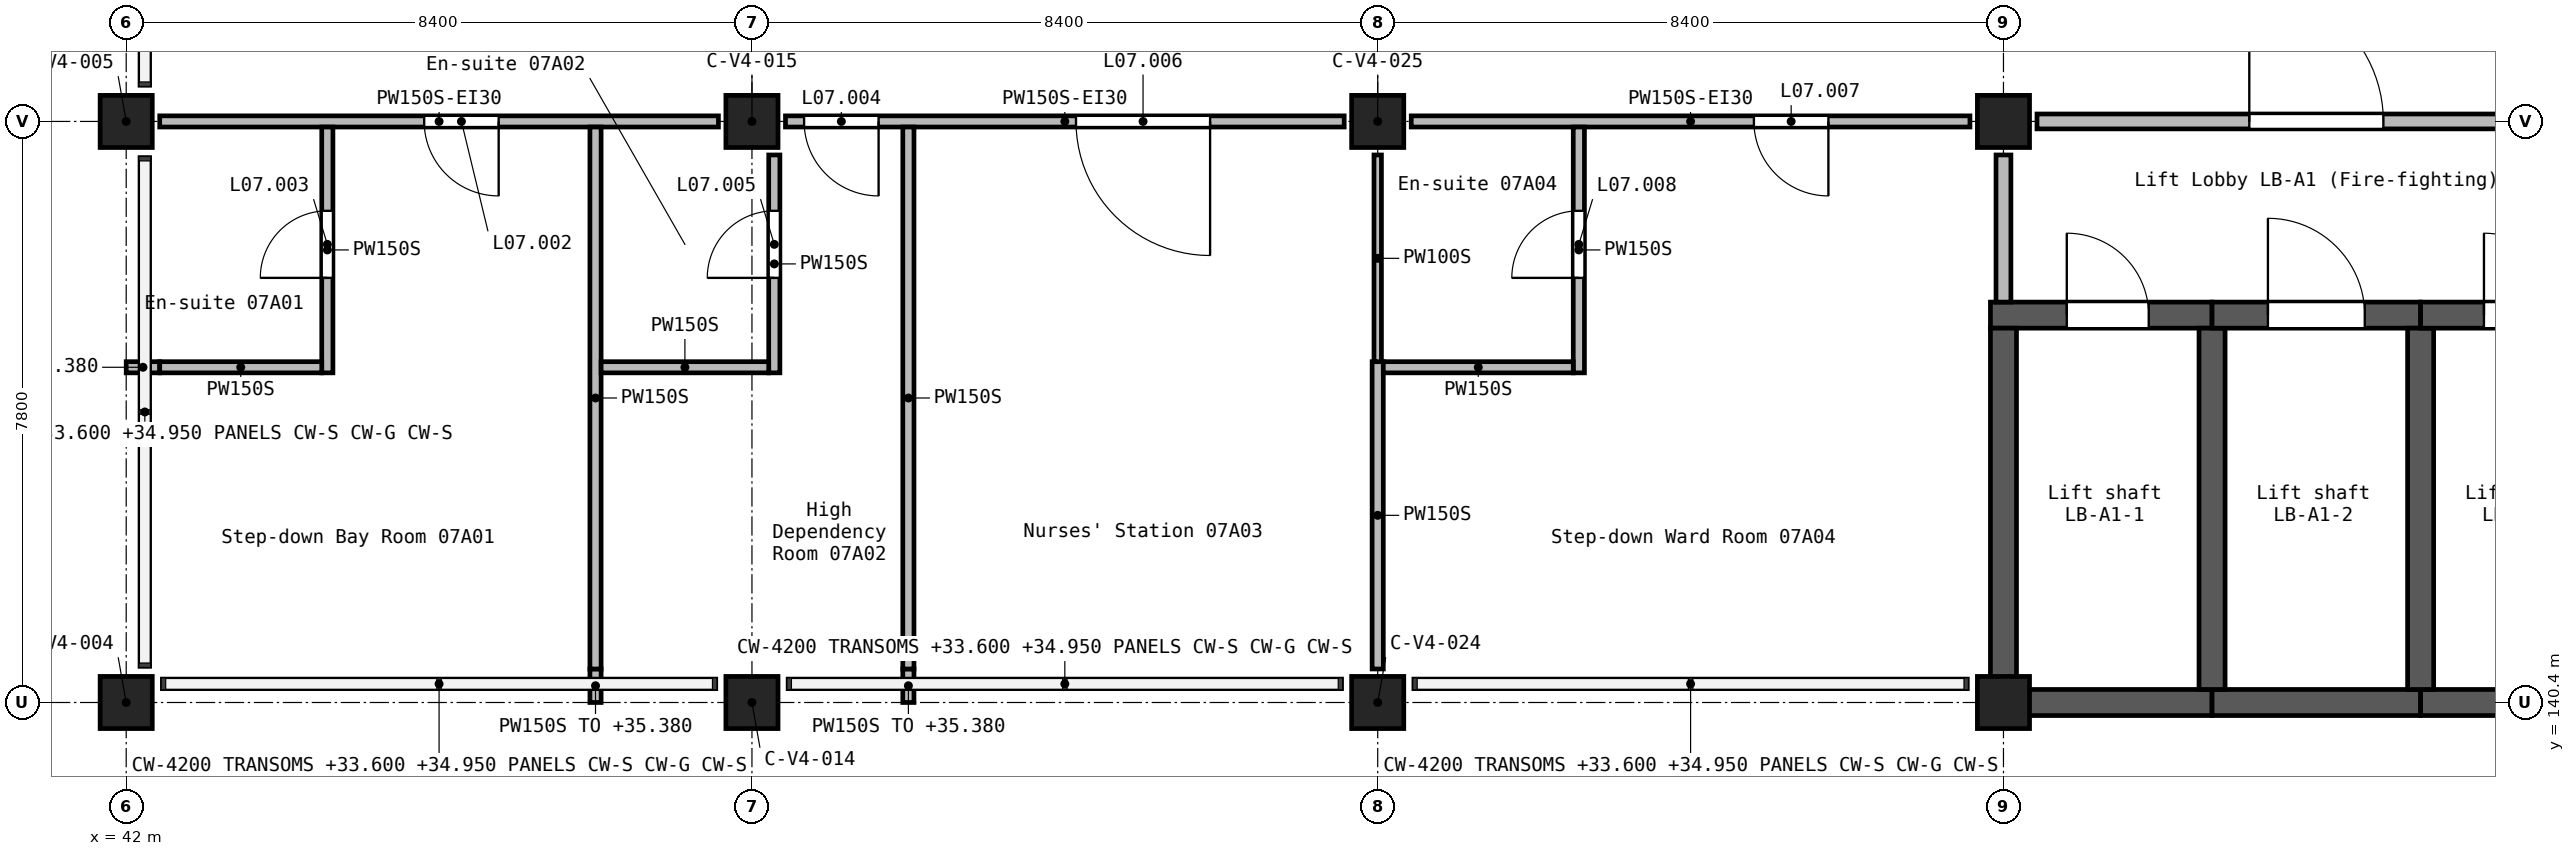
"""IFC4 building model, lengths in metres.
Left out: names, types, materials, properties, quantities, classifications, styles, units other than length and angle.
Written with IfcOpenShell. Run it as: python <this file> out.ifc"""

import sys

from ifc_helpers import new_model, si_unit, direction, frame, frame_2d, origin, origin_2d, place, context, subcontext, project, spatial, rectangle, extrude, element, fill, save


model = new_model("IFC4")
c1 = context("Model", 3, precision=1e-05, world=origin(), true_north=direction((0.0, 1.0)))
c2 = subcontext(c1, "Body", "Model", "MODEL_VIEW")
j1 = project(units=[si_unit("LENGTHUNIT", "METRE"), si_unit("PLANEANGLEUNIT", "RADIAN")], contexts=[c1])
p1 = place(None, origin())
s1 = spatial("IfcSite", under=j1, at=p1, CompositionType="ELEMENT")
p2 = place(p1, origin())
s2 = spatial("IfcBuilding", under=s1, at=p2, CompositionType="ELEMENT")
p3 = place(p2, frame((0.0, 0.0, 32.7)))
s3 = spatial("IfcBuildingStorey", under=s2, at=p3, CompositionType="ELEMENT", Elevation=32.7)
for number, where, z_axis, x_axis in (
    (1, (42.0, 140.4, 0.0), (0.0, 0.0, 1.0), (1.0, 0.0, 0.0)),
    (2, (42.0, 148.2, 0.0), (0.0, 0.0, 1.0), (1.0, 0.0, 0.0)),
    (3, (50.4, 140.4, 0.0), (0.0, 0.0, 1.0), (1.0, 0.0, 0.0)),
    (4, (50.4, 148.2, 0.0), (0.0, 0.0, 1.0), (1.0, 0.0, 0.0)),
    (5, (58.8, 140.4, 0.0), (0.0, 0.0, 1.0), (1.0, 0.0, 0.0)),
    (6, (58.8, 148.2, 0.0), (0.0, 0.0, 1.0), (1.0, 0.0, 0.0)),
    (7, (67.2, 140.4, 0.0), (0.0, 0.0, 1.0), (1.0, 0.0, 0.0)),
    (8, (67.2, 148.2, 0.0), (0.0, 0.0, 1.0), (1.0, 0.0, 0.0)),
):
    element("IfcColumn", number, at=place(p3, frame(where, z_axis=z_axis, x_axis=x_axis)), inside=s3, PredefinedType="COLUMN", context=c2, shape_type="SweptSolid", body=[
        extrude(rectangle(XDim=0.7, YDim=0.7, at=origin_2d()), origin(), (0.0, 0.0, 1.0), 3.9),
    ])
p4 = place(p3, frame((67.025, 145.6, 0.0), z_axis=(0.0, 0.0, 1.0), x_axis=(1.0, 0.0, 0.0)))
e9 = element("IfcWall", 9, at=p4, inside=s3, PredefinedType="SHEAR", context=c2, shape_type="SweptSolid", body=[
    extrude(rectangle(XDim=2.975, YDim=0.35, at=frame_2d((1.488, 0.0))), origin(), (0.0, 0.0, 1.0), 3.9),
])
p5 = place(p4, frame((1.025, 0.0, 0.0)))
e10 = element("IfcOpeningElement", 10, at=p5, cuts=e9, PredefinedType="OPENING", context=c2, shape_type="SweptSolid", body=[
    extrude(rectangle(XDim=1.1, YDim=2.1, at=frame_2d((0.55, 1.05))), frame((0.0, 0.185, 0.0), z_axis=(0.0, -1.0, 0.0), x_axis=(1.0, 0.0, 0.0)), (0.0, 0.0, 1.0), 0.37),
])
p6 = place(p3, frame((67.2, 140.225, 0.0), z_axis=(0.0, 0.0, 1.0), x_axis=(0.0, 1.0, 0.0)))
e11 = element("IfcWall", 11, at=p6, inside=s3, PredefinedType="SHEAR", context=c2, shape_type="SweptSolid", body=[
    extrude(rectangle(XDim=5.2, YDim=0.35, at=frame_2d((2.6, 0.0))), origin(), (0.0, 0.0, 1.0), 3.9),
])
p7 = place(p3, frame((67.375, 140.4, 0.0), z_axis=(0.0, 0.0, 1.0), x_axis=(1.0, 0.0, 0.0)))
e12 = element("IfcWall", 12, at=p7, inside=s3, PredefinedType="SHEAR", context=c2, shape_type="SweptSolid", body=[
    extrude(rectangle(XDim=2.625, YDim=0.35, at=frame_2d((1.312, 0.0))), origin(), (0.0, 0.0, 1.0), 3.9),
])
p8 = place(p3, frame((70.0, 140.4, 0.0), z_axis=(0.0, 0.0, 1.0), x_axis=(1.0, 0.0, 0.0)))
e13 = element("IfcWall", 13, at=p8, inside=s3, PredefinedType="SHEAR", context=c2, shape_type="SweptSolid", body=[
    extrude(rectangle(XDim=2.8, YDim=0.35, at=frame_2d((1.4, 0.0))), origin(), (0.0, 0.0, 1.0), 3.9),
])
p9 = place(p3, frame((70.0, 140.575, 0.0), z_axis=(0.0, 0.0, 1.0), x_axis=(0.0, 1.0, 0.0)))
e14 = element("IfcWall", 14, at=p9, inside=s3, PredefinedType="SHEAR", context=c2, shape_type="SweptSolid", body=[
    extrude(rectangle(XDim=4.85, YDim=0.35, at=frame_2d((2.425, 0.0))), origin(), (0.0, 0.0, 1.0), 3.9),
])
p10 = place(p3, frame((70.0, 145.6, 0.0), z_axis=(0.0, 0.0, 1.0), x_axis=(1.0, 0.0, 0.0)))
e15 = element("IfcWall", 15, at=p10, inside=s3, PredefinedType="SHEAR", context=c2, shape_type="SweptSolid", body=[
    extrude(rectangle(XDim=2.8, YDim=0.35, at=frame_2d((1.4, 0.0))), origin(), (0.0, 0.0, 1.0), 3.9),
])
p11 = place(p10, frame((0.75, 0.0, 0.0)))
e16 = element("IfcOpeningElement", 16, at=p11, cuts=e15, PredefinedType="OPENING", context=c2, shape_type="SweptSolid", body=[
    extrude(rectangle(XDim=1.3, YDim=2.1, at=frame_2d((0.65, 1.05))), frame((0.0, 0.185, 0.0), z_axis=(0.0, -1.0, 0.0), x_axis=(1.0, 0.0, 0.0)), (0.0, 0.0, 1.0), 0.37),
])
p12 = place(p3, frame((72.8, 140.4, 0.0), z_axis=(0.0, 0.0, 1.0), x_axis=(1.0, 0.0, 0.0)))
e17 = element("IfcWall", 17, at=p12, inside=s3, PredefinedType="SHEAR", context=c2, shape_type="SweptSolid", body=[
    extrude(rectangle(XDim=2.625, YDim=0.35, at=frame_2d((1.312, 0.0))), origin(), (0.0, 0.0, 1.0), 3.9),
])
p13 = place(p3, frame((72.8, 140.575, 0.0), z_axis=(0.0, 0.0, 1.0), x_axis=(0.0, 1.0, 0.0)))
e18 = element("IfcWall", 18, at=p13, inside=s3, PredefinedType="SHEAR", context=c2, shape_type="SweptSolid", body=[
    extrude(rectangle(XDim=4.85, YDim=0.35, at=frame_2d((2.425, 0.0))), origin(), (0.0, 0.0, 1.0), 3.9),
])
p14 = place(p3, frame((72.8, 145.6, 0.0), z_axis=(0.0, 0.0, 1.0), x_axis=(1.0, 0.0, 0.0)))
e19 = element("IfcWall", 19, at=p14, inside=s3, PredefinedType="SHEAR", context=c2, shape_type="SweptSolid", body=[
    extrude(rectangle(XDim=2.625, YDim=0.35, at=frame_2d((1.312, 0.0))), origin(), (0.0, 0.0, 1.0), 3.9),
])
p15 = place(p14, frame((0.85, 0.0, 0.0)))
e20 = element("IfcOpeningElement", 20, at=p15, cuts=e19, PredefinedType="OPENING", context=c2, shape_type="SweptSolid", body=[
    extrude(rectangle(XDim=1.1, YDim=2.1, at=frame_2d((0.55, 1.05))), frame((0.0, 0.185, 0.0), z_axis=(0.0, -1.0, 0.0), x_axis=(1.0, 0.0, 0.0)), (0.0, 0.0, 1.0), 0.37),
])
p16 = place(p3, frame((67.65, 148.2, 0.0), z_axis=(0.0, 0.0, 1.0), x_axis=(1.0, 0.0, 0.0)))
e21 = element("IfcWall", 21, at=p16, inside=s3, PredefinedType="SOLIDWALL", context=c2, shape_type="SweptSolid", body=[
    extrude(rectangle(XDim=7.5, YDim=0.2, at=frame_2d((3.75, 0.0))), origin(), (0.0, 0.0, 1.0), 3.6),
])
p17 = place(p16, frame((2.85, 0.0, 0.0)))
e22 = element("IfcOpeningElement", 22, at=p17, cuts=e21, PredefinedType="OPENING", context=c2, shape_type="SweptSolid", body=[
    extrude(rectangle(XDim=1.8, YDim=2.1, at=frame_2d((0.9, 1.05))), frame((0.0, 0.11, 0.0), z_axis=(0.0, -1.0, 0.0), x_axis=(1.0, 0.0, 0.0)), (0.0, 0.0, 1.0), 0.22),
])
p18 = place(p3, frame((67.2, 145.775, 0.0), z_axis=(0.0, 0.0, 1.0), x_axis=(0.0, 1.0, 0.0)))
e23 = element("IfcWall", 23, at=p18, inside=s3, PredefinedType="SOLIDWALL", context=c2, shape_type="SweptSolid", body=[
    extrude(rectangle(XDim=1.975, YDim=0.2, at=frame_2d((0.988, 0.0))), origin(), (0.0, 0.0, 1.0), 3.6),
])
p19 = place(p3, frame((66.75, 148.2, 0.0), z_axis=(0.0, 0.0, 1.0), x_axis=(-1.0, 0.0, 0.0)))
e24 = element("IfcWall", 24, at=p19, inside=s3, PredefinedType="PARTITIONING", context=c2, shape_type="SweptSolid", body=[
    extrude(rectangle(XDim=7.5, YDim=0.15, at=frame_2d((3.75, 0.0))), origin(), (0.0, 0.0, 1.0), 3.6),
])
p20 = place(p19, frame((1.9, 0.0, 0.0)))
e25 = element("IfcOpeningElement", 25, at=p20, cuts=e24, PredefinedType="OPENING", context=c2, shape_type="SweptSolid", body=[
    extrude(rectangle(XDim=1.0, YDim=2.1, at=frame_2d((0.5, 1.05))), frame((0.0, 0.085, 0.0), z_axis=(0.0, -1.0, 0.0), x_axis=(1.0, 0.0, 0.0)), (0.0, 0.0, 1.0), 0.17),
])
p21 = place(p3, frame((58.35, 148.2, 0.0), z_axis=(0.0, 0.0, 1.0), x_axis=(-1.0, 0.0, 0.0)))
e26 = element("IfcWall", 26, at=p21, inside=s3, PredefinedType="PARTITIONING", context=c2, shape_type="SweptSolid", body=[
    extrude(rectangle(XDim=7.5, YDim=0.15, at=frame_2d((3.75, 0.0))), origin(), (0.0, 0.0, 1.0), 3.6),
])
p22 = place(p21, frame((6.25, 0.0, 0.0)))
e27 = element("IfcOpeningElement", 27, at=p22, cuts=e26, PredefinedType="OPENING", context=c2, shape_type="SweptSolid", body=[
    extrude(rectangle(XDim=1.0, YDim=2.1, at=frame_2d((0.5, 1.05))), frame((0.0, 0.085, 0.0), z_axis=(0.0, -1.0, 0.0), x_axis=(1.0, 0.0, 0.0)), (0.0, 0.0, 1.0), 0.17),
])
p23 = place(p21, frame((1.8, 0.0, 0.0)))
e28 = element("IfcOpeningElement", 28, at=p23, cuts=e26, PredefinedType="OPENING", context=c2, shape_type="SweptSolid", body=[
    extrude(rectangle(XDim=1.8, YDim=2.1, at=frame_2d((0.9, 1.05))), frame((0.0, 0.085, 0.0), z_axis=(0.0, -1.0, 0.0), x_axis=(1.0, 0.0, 0.0)), (0.0, 0.0, 1.0), 0.17),
])
p24 = place(p3, frame((49.95, 148.2, 0.0), z_axis=(0.0, 0.0, 1.0), x_axis=(-1.0, 0.0, 0.0)))
e29 = element("IfcWall", 29, at=p24, inside=s3, PredefinedType="PARTITIONING", context=c2, shape_type="SweptSolid", body=[
    extrude(rectangle(XDim=7.5, YDim=0.15, at=frame_2d((3.75, 0.0))), origin(), (0.0, 0.0, 1.0), 3.6),
])
p25 = place(p24, frame((2.95, 0.0, 0.0)))
e30 = element("IfcOpeningElement", 30, at=p25, cuts=e29, PredefinedType="OPENING", context=c2, shape_type="SweptSolid", body=[
    extrude(rectangle(XDim=1.0, YDim=2.1, at=frame_2d((0.5, 1.05))), frame((0.0, 0.085, 0.0), z_axis=(0.0, -1.0, 0.0), x_axis=(1.0, 0.0, 0.0)), (0.0, 0.0, 1.0), 0.17),
])
p26 = place(p3, frame((48.3, 140.4, 0.0), z_axis=(0.0, 0.0, 1.0), x_axis=(0.0, 1.0, 0.0)))
e31 = element("IfcWall", 31, at=p26, inside=s3, PredefinedType="PARTITIONING", context=c2, shape_type="SweptSolid", body=[
    extrude(rectangle(XDim=0.45, YDim=0.15, at=frame_2d((0.225, 0.0))), origin(), (0.0, 0.0, 1.0), 2.68),
])
p27 = place(p3, frame((48.3, 140.85, 0.0), z_axis=(0.0, 0.0, 1.0), x_axis=(0.0, 1.0, 0.0)))
e32 = element("IfcWall", 32, at=p27, inside=s3, PredefinedType="PARTITIONING", context=c2, shape_type="SweptSolid", body=[
    extrude(rectangle(XDim=7.275, YDim=0.15, at=frame_2d((3.637, 0.0))), origin(), (0.0, 0.0, 1.0), 3.6),
])
p28 = place(p3, frame((52.5, 140.4, 0.0), z_axis=(0.0, 0.0, 1.0), x_axis=(0.0, 1.0, 0.0)))
e33 = element("IfcWall", 33, at=p28, inside=s3, PredefinedType="PARTITIONING", context=c2, shape_type="SweptSolid", body=[
    extrude(rectangle(XDim=0.45, YDim=0.15, at=frame_2d((0.225, 0.0))), origin(), (0.0, 0.0, 1.0), 2.68),
])
p29 = place(p3, frame((52.5, 140.85, 0.0), z_axis=(0.0, 0.0, 1.0), x_axis=(0.0, 1.0, 0.0)))
e34 = element("IfcWall", 34, at=p29, inside=s3, PredefinedType="PARTITIONING", context=c2, shape_type="SweptSolid", body=[
    extrude(rectangle(XDim=7.275, YDim=0.15, at=frame_2d((3.637, 0.0))), origin(), (0.0, 0.0, 1.0), 3.6),
])
p30 = place(p3, frame((58.8, 140.85, 0.0), z_axis=(0.0, 0.0, 1.0), x_axis=(0.0, 1.0, 0.0)))
e35 = element("IfcWall", 35, at=p30, inside=s3, PredefinedType="PARTITIONING", context=c2, shape_type="SweptSolid", body=[
    extrude(rectangle(XDim=4.125, YDim=0.15, at=frame_2d((2.062, 0.0))), origin(), (0.0, 0.0, 1.0), 3.6),
])
p31 = place(p3, frame((44.7, 144.825, 0.0), z_axis=(0.0, 0.0, 1.0), x_axis=(0.0, 1.0, 0.0)))
e36 = element("IfcWall", 36, at=p31, inside=s3, PredefinedType="PARTITIONING", context=c2, shape_type="SweptSolid", body=[
    extrude(rectangle(XDim=3.3, YDim=0.15, at=frame_2d((1.65, 0.0))), origin(), (0.0, 0.0, 1.0), 3.6),
])
p32 = place(p31, frame((1.275, 0.0, 0.0)))
e37 = element("IfcOpeningElement", 37, at=p32, cuts=e36, PredefinedType="OPENING", context=c2, shape_type="SweptSolid", body=[
    extrude(rectangle(XDim=0.9, YDim=2.1, at=frame_2d((0.45, 1.05))), frame((0.0, 0.085, 0.0), z_axis=(0.0, -1.0, 0.0), x_axis=(1.0, 0.0, 0.0)), (0.0, 0.0, 1.0), 0.17),
])
p33 = place(p3, frame((50.7, 144.825, 0.0), z_axis=(0.0, 0.0, 1.0), x_axis=(0.0, 1.0, 0.0)))
e38 = element("IfcWall", 38, at=p33, inside=s3, PredefinedType="PARTITIONING", context=c2, shape_type="SweptSolid", body=[
    extrude(rectangle(XDim=2.925, YDim=0.15, at=frame_2d((1.462, 0.0))), origin(), (0.0, 0.0, 1.0), 3.6),
])
p34 = place(p33, frame((1.275, 0.0, 0.0)))
e39 = element("IfcOpeningElement", 39, at=p34, cuts=e38, PredefinedType="OPENING", context=c2, shape_type="SweptSolid", body=[
    extrude(rectangle(XDim=0.9, YDim=2.1, at=frame_2d((0.45, 1.05))), frame((0.0, 0.085, 0.0), z_axis=(0.0, -1.0, 0.0), x_axis=(1.0, 0.0, 0.0)), (0.0, 0.0, 1.0), 0.17),
])
p35 = place(p3, frame((61.5, 144.825, 0.0), z_axis=(0.0, 0.0, 1.0), x_axis=(0.0, 1.0, 0.0)))
e40 = element("IfcWall", 40, at=p35, inside=s3, PredefinedType="PARTITIONING", context=c2, shape_type="SweptSolid", body=[
    extrude(rectangle(XDim=3.3, YDim=0.15, at=frame_2d((1.65, 0.0))), origin(), (0.0, 0.0, 1.0), 3.6),
])
p36 = place(p35, frame((1.275, 0.0, 0.0)))
e41 = element("IfcOpeningElement", 41, at=p36, cuts=e40, PredefinedType="OPENING", context=c2, shape_type="SweptSolid", body=[
    extrude(rectangle(XDim=0.9, YDim=2.1, at=frame_2d((0.45, 1.05))), frame((0.0, 0.085, 0.0), z_axis=(0.0, -1.0, 0.0), x_axis=(1.0, 0.0, 0.0)), (0.0, 0.0, 1.0), 0.17),
])
p37 = place(p3, frame((42.0, 144.9, 0.0), z_axis=(0.0, 0.0, 1.0), x_axis=(1.0, 0.0, 0.0)))
e42 = element("IfcWall", 42, at=p37, inside=s3, PredefinedType="PARTITIONING", context=c2, shape_type="SweptSolid", body=[
    extrude(rectangle(XDim=0.45, YDim=0.15, at=frame_2d((0.225, 0.0))), origin(), (0.0, 0.0, 1.0), 2.68),
])
p38 = place(p3, frame((42.45, 144.9, 0.0), z_axis=(0.0, 0.0, 1.0), x_axis=(1.0, 0.0, 0.0)))
e43 = element("IfcWall", 43, at=p38, inside=s3, PredefinedType="PARTITIONING", context=c2, shape_type="SweptSolid", body=[
    extrude(rectangle(XDim=2.175, YDim=0.15, at=frame_2d((1.087, 0.0))), origin(), (0.0, 0.0, 1.0), 3.6),
])
p39 = place(p3, frame((58.875, 144.9, 0.0), z_axis=(0.0, 0.0, 1.0), x_axis=(1.0, 0.0, 0.0)))
e44 = element("IfcWall", 44, at=p39, inside=s3, PredefinedType="PARTITIONING", context=c2, shape_type="SweptSolid", body=[
    extrude(rectangle(XDim=2.55, YDim=0.15, at=frame_2d((1.275, 0.0))), origin(), (0.0, 0.0, 1.0), 3.6),
])
p40 = place(p3, frame((48.375, 144.9, 0.0), z_axis=(0.0, 0.0, 1.0), x_axis=(1.0, 0.0, 0.0)))
e45 = element("IfcWall", 45, at=p40, inside=s3, PredefinedType="PARTITIONING", context=c2, shape_type="SweptSolid", body=[
    extrude(rectangle(XDim=2.25, YDim=0.15, at=frame_2d((1.125, 0.0))), origin(), (0.0, 0.0, 1.0), 3.6),
])
p41 = place(p3, frame((58.8, 144.975, 0.0), z_axis=(0.0, 0.0, 1.0), x_axis=(0.0, 1.0, 0.0)))
e46 = element("IfcWall", 46, at=p41, inside=s3, PredefinedType="PARTITIONING", context=c2, shape_type="SweptSolid", body=[
    extrude(rectangle(XDim=2.775, YDim=0.1, at=frame_2d((1.387, 0.0))), origin(), (0.0, 0.0, 1.0), 3.6),
])
p42 = place(p25, origin())
e47 = element("IfcDoor", 47, at=p42, inside=s3, OperationType="SINGLE_SWING_LEFT", PredefinedType="DOOR", context=c2, shape_type="SweptSolid", body=[
    extrude(rectangle(XDim=1.0, YDim=2.1, at=frame_2d((0.5, 1.05))), frame((0.0, 0.025, 0.0), z_axis=(0.0, -1.0, 0.0), x_axis=(1.0, 0.0, 0.0)), (0.0, 0.0, 1.0), 0.05),
])
fill(e30, e47)
p43 = place(p32, origin())
e48 = element("IfcDoor", 48, at=p43, inside=s3, OperationType="SINGLE_SWING_RIGHT", PredefinedType="DOOR", context=c2, shape_type="SweptSolid", body=[
    extrude(rectangle(XDim=0.9, YDim=2.1, at=frame_2d((0.45, 1.05))), frame((0.0, 0.025, 0.0), z_axis=(0.0, -1.0, 0.0), x_axis=(1.0, 0.0, 0.0)), (0.0, 0.0, 1.0), 0.05),
])
fill(e37, e48)
p44 = place(p22, origin())
e49 = element("IfcDoor", 49, at=p44, inside=s3, OperationType="SINGLE_SWING_RIGHT", PredefinedType="DOOR", context=c2, shape_type="SweptSolid", body=[
    extrude(rectangle(XDim=1.0, YDim=2.1, at=frame_2d((0.5, 1.05))), frame((0.0, 0.025, 0.0), z_axis=(0.0, -1.0, 0.0), x_axis=(1.0, 0.0, 0.0)), (0.0, 0.0, 1.0), 0.05),
])
fill(e27, e49)
p45 = place(p34, origin())
e50 = element("IfcDoor", 50, at=p45, inside=s3, OperationType="SINGLE_SWING_RIGHT", PredefinedType="DOOR", context=c2, shape_type="SweptSolid", body=[
    extrude(rectangle(XDim=0.9, YDim=2.1, at=frame_2d((0.45, 1.05))), frame((0.0, 0.025, 0.0), z_axis=(0.0, -1.0, 0.0), x_axis=(1.0, 0.0, 0.0)), (0.0, 0.0, 1.0), 0.05),
])
fill(e39, e50)
p46 = place(p23, origin())
e51 = element("IfcDoor", 51, at=p46, inside=s3, OperationType="DOUBLE_DOOR_SINGLE_SWING", PredefinedType="DOOR", context=c2, shape_type="SweptSolid", body=[
    extrude(rectangle(XDim=1.8, YDim=2.1, at=frame_2d((0.9, 1.05))), frame((0.0, 0.025, 0.0), z_axis=(0.0, -1.0, 0.0), x_axis=(1.0, 0.0, 0.0)), (0.0, 0.0, 1.0), 0.05),
])
fill(e28, e51)
p47 = place(p20, origin())
e52 = element("IfcDoor", 52, at=p47, inside=s3, OperationType="SINGLE_SWING_LEFT", PredefinedType="DOOR", context=c2, shape_type="SweptSolid", body=[
    extrude(rectangle(XDim=1.0, YDim=2.1, at=frame_2d((0.5, 1.05))), frame((0.0, 0.025, 0.0), z_axis=(0.0, -1.0, 0.0), x_axis=(1.0, 0.0, 0.0)), (0.0, 0.0, 1.0), 0.05),
])
fill(e25, e52)
p48 = place(p36, origin())
e53 = element("IfcDoor", 53, at=p48, inside=s3, OperationType="SINGLE_SWING_RIGHT", PredefinedType="DOOR", context=c2, shape_type="SweptSolid", body=[
    extrude(rectangle(XDim=0.9, YDim=2.1, at=frame_2d((0.45, 1.05))), frame((0.0, 0.025, 0.0), z_axis=(0.0, -1.0, 0.0), x_axis=(1.0, 0.0, 0.0)), (0.0, 0.0, 1.0), 0.05),
])
fill(e41, e53)
p49 = place(p17, frame((1.8, 0.0, 0.0), z_axis=(0.0, 0.0, 1.0), x_axis=(-1.0, 0.0, 0.0)))
e54 = element("IfcDoor", 54, at=p49, inside=s3, OperationType="DOUBLE_DOOR_SINGLE_SWING", PredefinedType="DOOR", context=c2, shape_type="SweptSolid", body=[
    extrude(rectangle(XDim=1.8, YDim=2.1, at=frame_2d((0.9, 1.05))), frame((0.0, 0.025, 0.0), z_axis=(0.0, -1.0, 0.0), x_axis=(1.0, 0.0, 0.0)), (0.0, 0.0, 1.0), 0.05),
])
fill(e22, e54)
p50 = place(p5, origin())
e55 = element("IfcDoor", 55, at=p50, inside=s3, OperationType="DOUBLE_DOOR_SLIDING", PredefinedType="DOOR", context=c2, shape_type="SweptSolid", body=[
    extrude(rectangle(XDim=1.1, YDim=2.1, at=frame_2d((0.55, 1.05))), frame((0.0, 0.025, 0.0), z_axis=(0.0, -1.0, 0.0), x_axis=(1.0, 0.0, 0.0)), (0.0, 0.0, 1.0), 0.05),
])
fill(e10, e55)
p51 = place(p11, origin())
e56 = element("IfcDoor", 56, at=p51, inside=s3, OperationType="DOUBLE_DOOR_SLIDING", PredefinedType="DOOR", context=c2, shape_type="SweptSolid", body=[
    extrude(rectangle(XDim=1.3, YDim=2.1, at=frame_2d((0.65, 1.05))), frame((0.0, 0.025, 0.0), z_axis=(0.0, -1.0, 0.0), x_axis=(1.0, 0.0, 0.0)), (0.0, 0.0, 1.0), 0.05),
])
fill(e16, e56)
p52 = place(p15, origin())
e57 = element("IfcDoor", 57, at=p52, inside=s3, OperationType="DOUBLE_DOOR_SLIDING", PredefinedType="DOOR", context=c2, shape_type="SweptSolid", body=[
    extrude(rectangle(XDim=1.1, YDim=2.1, at=frame_2d((0.55, 1.05))), frame((0.0, 0.025, 0.0), z_axis=(0.0, -1.0, 0.0), x_axis=(1.0, 0.0, 0.0)), (0.0, 0.0, 1.0), 0.05),
])
fill(e20, e57)
save(model, sys.argv[1])
